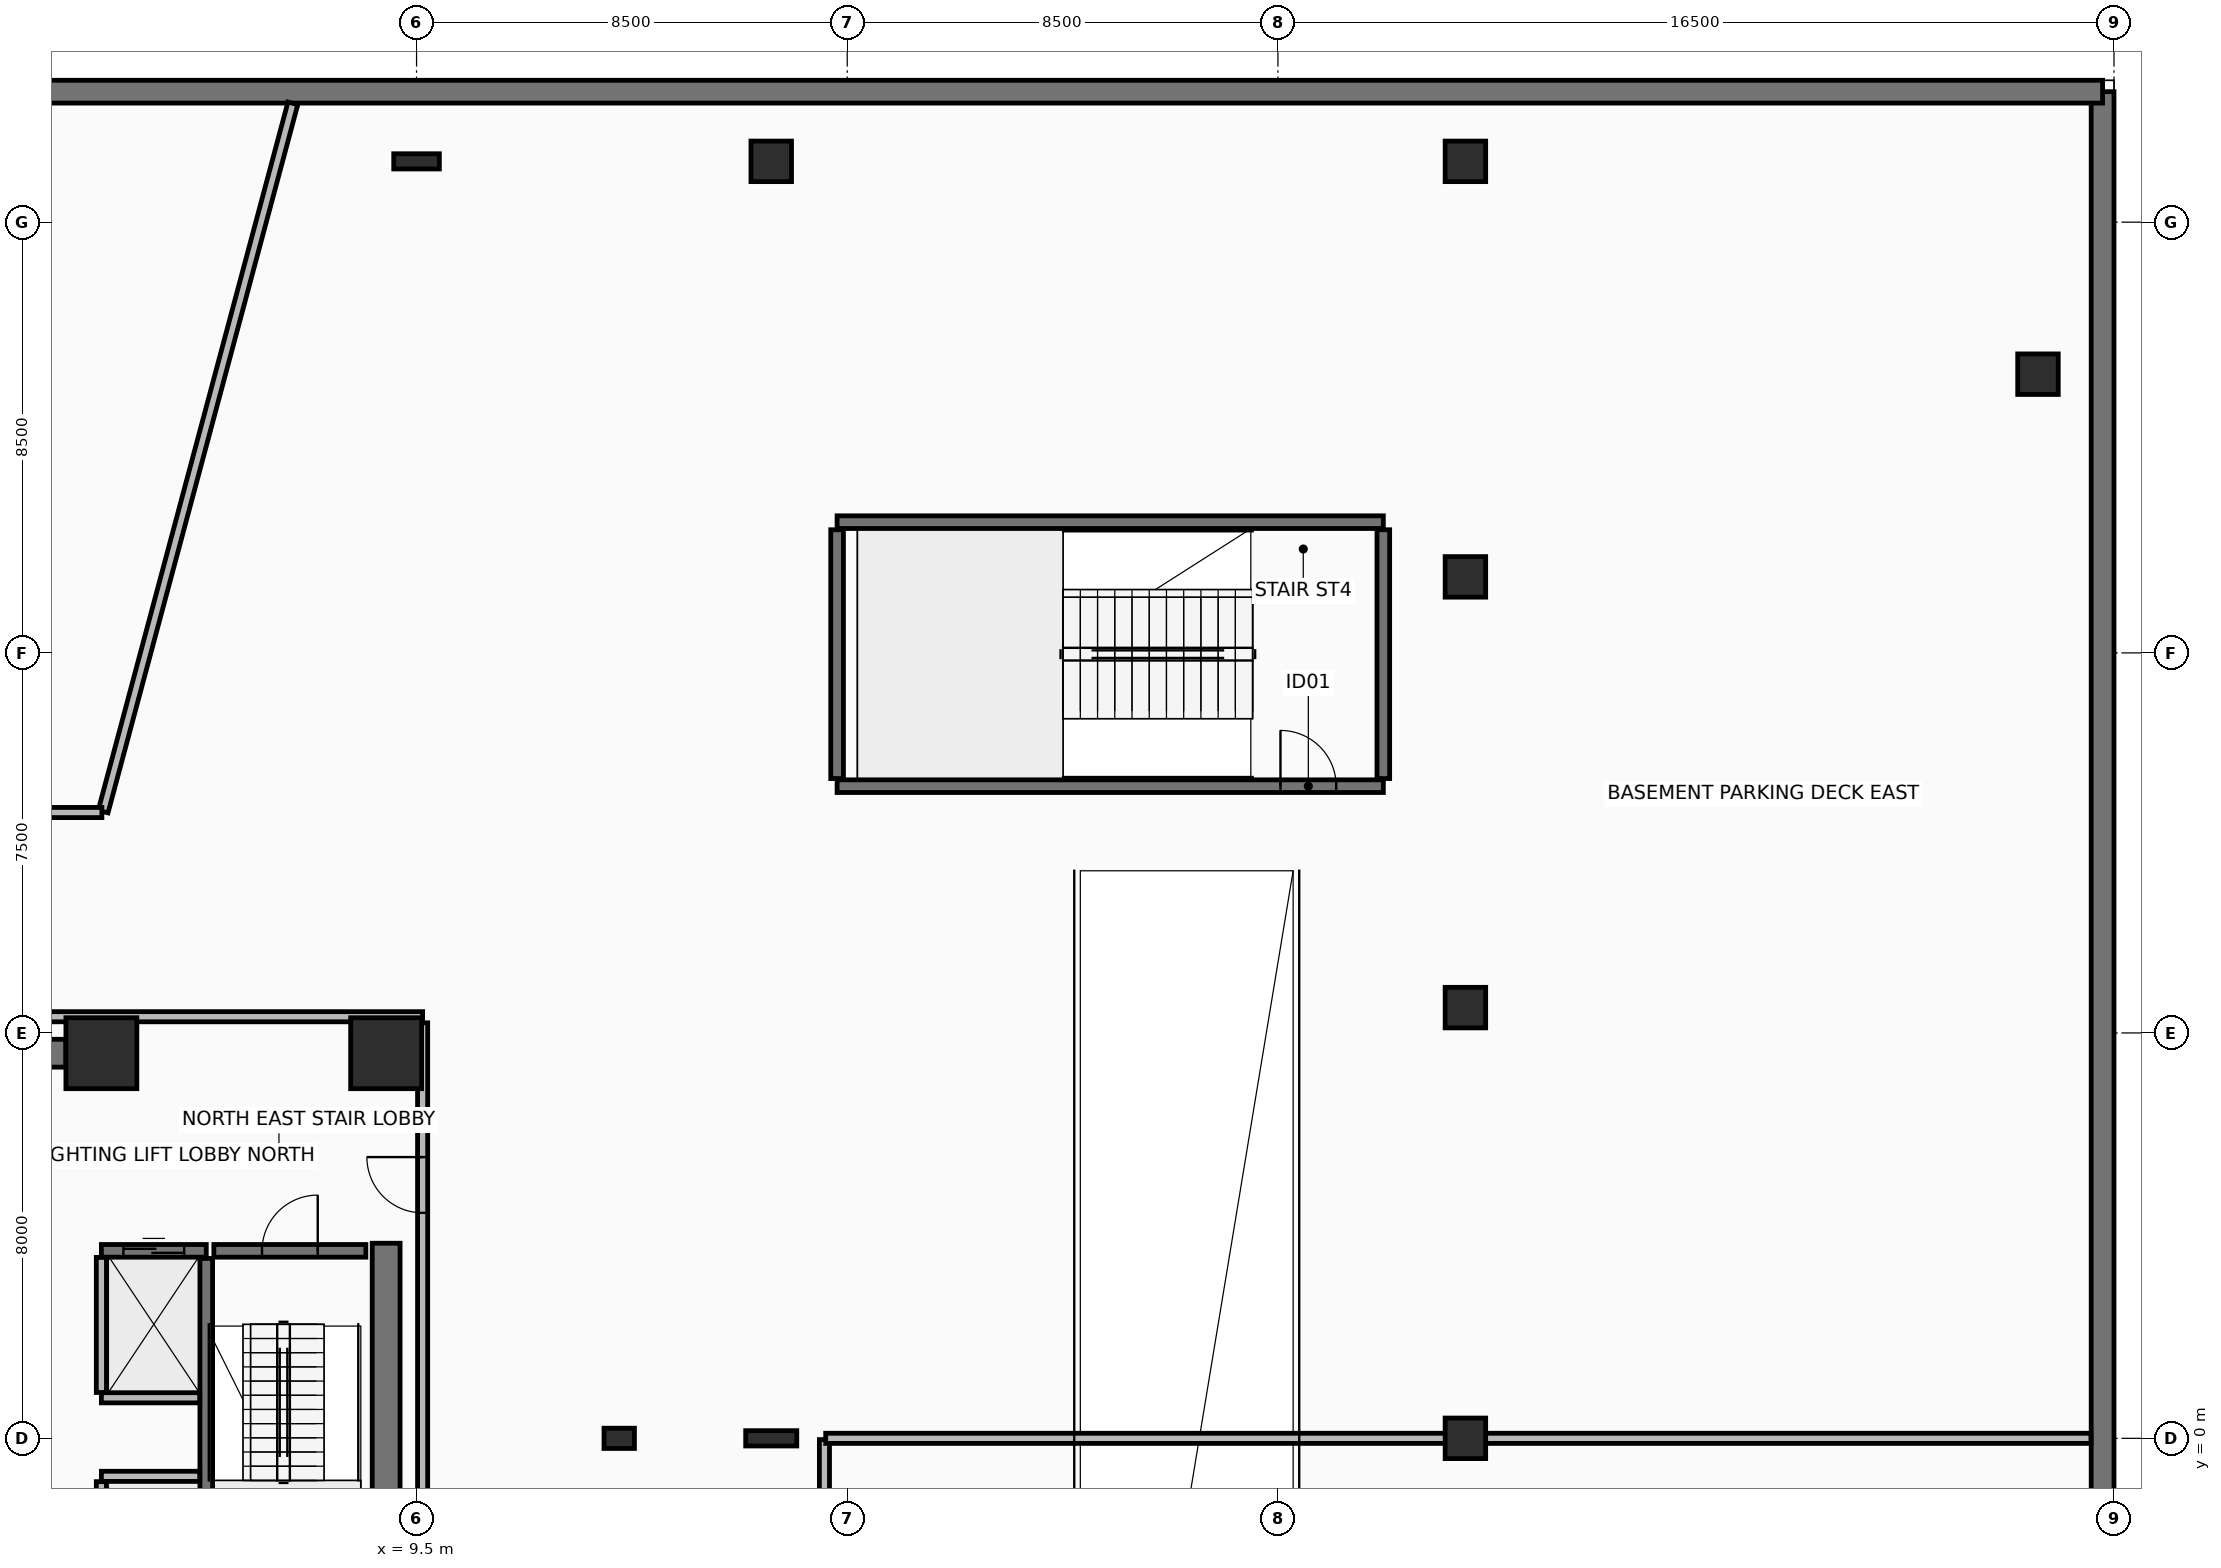
"""IFC4 building model, lengths in metres.
Left out: names, types, materials, properties, quantities, classifications, styles, units other than length and angle.
Written with IfcOpenShell. Run it as: python <this file> out.ifc"""

import sys

from ifc_helpers import new_model, si_unit, direction, frame, frame_2d, origin, origin_2d, place, context, subcontext, project, spatial, rectangle, hollow_rectangle, i_section, extrude, element, fill, save


model = new_model("IFC4")
c1 = context("Model", 3, precision=1e-05, world=origin(), true_north=direction((0.0, 1.0)))
c2 = subcontext(c1, "Body", "Model", "MODEL_VIEW")
j1 = project(units=[si_unit("LENGTHUNIT", "METRE"), si_unit("PLANEANGLEUNIT", "RADIAN")], contexts=[c1])
p1 = place(None, origin())
s1 = spatial("IfcSite", under=j1, at=p1, CompositionType="ELEMENT")
p2 = place(p1, origin())
s2 = spatial("IfcBuilding", under=s1, at=p2, CompositionType="ELEMENT")
p3 = place(p2, frame((0.0, 0.0, -4.5)))
s3 = spatial("IfcBuildingStorey", under=s2, at=p3, CompositionType="ELEMENT", Elevation=-4.5)
for number, where, z_axis, x_axis in (
    (1, (8.9, 7.6, 0.0), (0.0, 0.0, 1.0), (1.0, 0.0, 0.0)),
    (2, (3.28, 7.6, 0.0), (0.0, 0.0, 1.0), (1.0, 0.0, 0.0)),
):
    element("IfcColumn", number, at=place(p3, frame(where, z_axis=z_axis, x_axis=x_axis)), inside=s3, PredefinedType="COLUMN", context=c2, shape_type="SweptSolid", body=[
        extrude(rectangle(XDim=1.4, YDim=1.4, at=origin_2d()), origin(), (0.0, 0.0, 1.0), 4.5),
    ])
p4 = place(p3, frame((13.5, 0.0, 0.0), z_axis=(0.0, 0.0, 1.0), x_axis=(1.0, 0.0, 0.0)))
e3 = element("IfcColumn", 3, at=p4, inside=s3, PredefinedType="PILASTER", context=c2, shape_type="SweptSolid", body=[
    extrude(rectangle(XDim=0.6, YDim=0.4, at=origin_2d()), origin(), (0.0, 0.0, 1.0), 4.5),
])
p5 = place(p3, frame((9.5, 25.2, 0.0), z_axis=(0.0, 0.0, 1.0), x_axis=(1.0, 0.0, 0.0)))
e4 = element("IfcColumn", 4, at=p5, inside=s3, PredefinedType="COLUMN", context=c2, shape_type="SweptSolid", body=[
    extrude(i_section(OverallWidth=0.3, OverallDepth=0.9, WebThickness=0.019, FlangeThickness=0.035, at=origin_2d()), origin(), (0.0, 0.0, 1.0), 4.5),
])
for number, where, z_axis, x_axis in (
    (5, (16.5, 25.2, 0.0), (0.0, 0.0, 1.0), (1.0, 0.0, 0.0)),
    (6, (30.2, 25.2, 0.0), (0.0, 0.0, 1.0), (1.0, 0.0, 0.0)),
    (7, (30.2, 0.0, 0.0), (0.0, 0.0, 1.0), (1.0, 0.0, 0.0)),
    (8, (30.2, 8.5, 0.0), (0.0, 0.0, 1.0), (1.0, 0.0, 0.0)),
    (9, (30.2, 17.0, 0.0), (0.0, 0.0, 1.0), (1.0, 0.0, 0.0)),
):
    element("IfcColumn", number, at=place(p3, frame(where, z_axis=z_axis, x_axis=x_axis)), inside=s3, PredefinedType="COLUMN", context=c2, shape_type="SweptSolid", body=[
        extrude(hollow_rectangle(XDim=0.8, YDim=0.8, WallThickness=0.045, at=origin_2d()), origin(), (0.0, 0.0, 1.0), 4.5),
    ])
p6 = place(p3, frame((16.5, 0.0, 0.0), z_axis=(0.0, 0.0, 1.0), x_axis=(1.0, 0.0, 0.0)))
e10 = element("IfcColumn", 10, at=p6, inside=s3, PredefinedType="COLUMN", context=c2, shape_type="SweptSolid", body=[
    extrude(i_section(OverallWidth=0.302, OverallDepth=1.008, WebThickness=0.021, FlangeThickness=0.04, at=origin_2d()), origin(), (0.0, 0.0, 1.0), 4.5),
])
p7 = place(p3, frame((41.5, 21.0, 0.0), z_axis=(0.0, 0.0, 1.0), x_axis=(1.0, 0.0, 0.0)))
e11 = element("IfcColumn", 11, at=p7, inside=s3, PredefinedType="COLUMN", context=c2, shape_type="SweptSolid", body=[
    extrude(hollow_rectangle(XDim=0.8, YDim=0.8, WallThickness=0.045, at=origin_2d()), origin(), (0.0, 0.0, 1.0), 4.5),
])
p8 = place(p3, frame((42.775, -27.775, 0.0), z_axis=(0.0, 0.0, 1.0), x_axis=(0.0, 1.0, 0.0)))
e12 = element("IfcWall", 12, at=p8, inside=s3, PredefinedType="STANDARD", context=c2, shape_type="SweptSolid", body=[
    extrude(rectangle(XDim=54.35, YDim=0.45, at=frame_2d((27.175, 0.0))), origin(), (0.0, 0.0, 1.0), 4.2),
])
p9 = place(p3, frame((42.775, 26.575, 0.0), z_axis=(0.0, 0.0, 1.0), x_axis=(-1.0, 0.0, 0.0)))
e13 = element("IfcWall", 13, at=p9, inside=s3, PredefinedType="STANDARD", context=c2, shape_type="SweptSolid", body=[
    extrude(rectangle(XDim=85.55, YDim=0.45, at=frame_2d((42.775, 0.0))), origin(), (0.0, 0.0, 1.0), 4.2),
])
p10 = place(p3, frame((-2.8, 7.6, 0.0), z_axis=(0.0, 0.0, 1.0), x_axis=(1.0, 0.0, 0.0)))
e14 = element("IfcWall", 14, at=p10, inside=s3, PredefinedType="SHEAR", context=c2, shape_type="SweptSolid", body=[
    extrude(rectangle(XDim=5.38, YDim=0.55, at=frame_2d((2.69, 0.0))), origin(), (0.0, 0.0, 1.0), 4.2),
])
p11 = place(p3, frame((8.9, -6.85, 0.0), z_axis=(0.0, 0.0, 1.0), x_axis=(0.0, 1.0, 0.0)))
e15 = element("IfcWall", 15, at=p11, inside=s3, PredefinedType="SHEAR", context=c2, shape_type="SweptSolid", body=[
    extrude(rectangle(XDim=10.7, YDim=0.55, at=frame_2d((5.35, 0.0))), origin(), (0.0, 0.0, 1.0), 4.2),
])
p12 = place(p3, frame((9.62, 8.32, 0.0), z_axis=(0.0, 0.0, 1.0), x_axis=(-1.0, 0.0, 0.0)))
e16 = element("IfcWall", 16, at=p12, inside=s3, PredefinedType="PARTITIONING", context=c2, shape_type="SweptSolid", body=[
    extrude(rectangle(XDim=19.24, YDim=0.2, at=frame_2d((9.62, 0.0))), origin(), (0.0, 0.0, 1.0), 3.545),
])
p13 = place(p12, frame((14.22, 0.0, 0.0)))
e17 = element("IfcOpeningElement", 17, at=p13, cuts=e16, PredefinedType="OPENING", context=c2, shape_type="SweptSolid", body=[
    extrude(rectangle(XDim=0.9, YDim=2.1, at=frame_2d((0.45, 1.05))), frame((0.0, 0.11, 0.0), z_axis=(0.0, -1.0, 0.0), x_axis=(1.0, 0.0, 0.0)), (0.0, 0.0, 1.0), 0.22),
])
p14 = place(p3, frame((9.62, -8.2, 0.0), z_axis=(0.0, 0.0, 1.0), x_axis=(0.0, 1.0, 0.0)))
e18 = element("IfcWall", 18, at=p14, inside=s3, PredefinedType="PARTITIONING", context=c2, shape_type="SweptSolid", body=[
    extrude(rectangle(XDim=16.4, YDim=0.2, at=frame_2d((8.2, 0.0))), origin(), (0.0, 0.0, 1.0), 3.545),
])
p15 = place(p14, frame((12.65, 0.0, 0.0)))
e19 = element("IfcOpeningElement", 19, at=p15, cuts=e18, PredefinedType="OPENING", context=c2, shape_type="SweptSolid", body=[
    extrude(rectangle(XDim=1.1, YDim=2.15, at=frame_2d((0.55, 1.075))), frame((0.0, 0.11, 0.0), z_axis=(0.0, -1.0, 0.0), x_axis=(1.0, 0.0, 0.0)), (0.0, 0.0, 1.0), 0.22),
])
p16 = place(p3, frame((5.35, -3.75, 0.0), z_axis=(0.0, 0.0, 1.0), x_axis=(0.0, 1.0, 0.0)))
e20 = element("IfcWall", 20, at=p16, inside=s3, PredefinedType="SHEAR", context=c2, shape_type="SweptSolid", body=[
    extrude(rectangle(XDim=7.3, YDim=0.25, at=frame_2d((3.65, 0.0))), origin(), (0.0, 0.0, 1.0), 4.2),
])
p17 = place(p3, frame((5.5, 3.7, 0.0), z_axis=(0.0, 0.0, 1.0), x_axis=(1.0, 0.0, 0.0)))
e21 = element("IfcWall", 21, at=p17, inside=s3, PredefinedType="SHEAR", context=c2, shape_type="SweptSolid", body=[
    extrude(rectangle(XDim=3.0, YDim=0.25, at=frame_2d((1.5, 0.0))), origin(), (0.0, 0.0, 1.0), 4.2),
])
p18 = place(p17, frame((0.95, 0.0, 0.0)))
e22 = element("IfcOpeningElement", 22, at=p18, cuts=e21, PredefinedType="OPENING", context=c2, shape_type="SweptSolid", body=[
    extrude(rectangle(XDim=1.1, YDim=2.15, at=frame_2d((0.55, 1.075))), frame((0.0, 0.135, 0.0), z_axis=(0.0, -1.0, 0.0), x_axis=(1.0, 0.0, 0.0)), (0.0, 0.0, 1.0), 0.27),
])
p19 = place(p3, frame((17.8, 12.87, 0.0), z_axis=(0.0, 0.0, 1.0), x_axis=(1.0, 0.0, 0.0)))
e23 = element("IfcWall", 23, at=p19, inside=s3, PredefinedType="SHEAR", context=c2, shape_type="SweptSolid", body=[
    extrude(rectangle(XDim=10.78, YDim=0.25, at=frame_2d((5.39, 0.0))), origin(), (0.0, 0.0, 1.0), 4.2),
])
p20 = place(p19, frame((8.75, 0.0, 0.0)))
e24 = element("IfcOpeningElement", 24, at=p20, cuts=e23, PredefinedType="OPENING", context=c2, shape_type="SweptSolid", body=[
    extrude(rectangle(XDim=1.1, YDim=2.15, at=frame_2d((0.55, 1.075))), frame((0.0, 0.135, 0.0), z_axis=(0.0, -1.0, 0.0), x_axis=(1.0, 0.0, 0.0)), (0.0, 0.0, 1.0), 0.27),
])
p21 = place(p3, frame((17.8, 18.08, 0.0), z_axis=(0.0, 0.0, 1.0), x_axis=(1.0, 0.0, 0.0)))
e25 = element("IfcWall", 25, at=p21, inside=s3, PredefinedType="SHEAR", context=c2, shape_type="SweptSolid", body=[
    extrude(rectangle(XDim=10.78, YDim=0.25, at=frame_2d((5.39, 0.0))), origin(), (0.0, 0.0, 1.0), 4.2),
])
for number, where, z_axis, x_axis in (
    (26, (17.8, 13.02, 0.0), (0.0, 0.0, 1.0), (0.0, 1.0, 0.0)),
    (27, (28.58, 13.02, 0.0), (0.0, 0.0, 1.0), (0.0, 1.0, 0.0)),
):
    element("IfcWall", number, at=place(p3, frame(where, z_axis=z_axis, x_axis=x_axis)), inside=s3, PredefinedType="SHEAR", context=c2, shape_type="SweptSolid", body=[
        extrude(rectangle(XDim=4.91, YDim=0.25, at=frame_2d((2.455, 0.0))), origin(), (0.0, 0.0, 1.0), 4.2),
    ])
p22 = place(p3, frame((3.28, 3.7, 0.0), z_axis=(0.0, 0.0, 1.0), x_axis=(1.0, 0.0, 0.0)))
e28 = element("IfcWall", 28, at=p22, inside=s3, PredefinedType="SHEAR", context=c2, shape_type="SweptSolid", body=[
    extrude(rectangle(XDim=2.07, YDim=0.25, at=frame_2d((1.035, 0.0))), origin(), (0.0, 0.0, 1.0), 4.2),
])
p23 = place(p22, frame((0.435, 0.0, 0.0)))
e29 = element("IfcOpeningElement", 29, at=p23, cuts=e28, PredefinedType="OPENING", context=c2, shape_type="SweptSolid", body=[
    extrude(rectangle(XDim=1.2, YDim=2.2, at=frame_2d((0.6, 1.1))), frame((0.0, 0.135, 0.0), z_axis=(0.0, -1.0, 0.0), x_axis=(1.0, 0.0, 0.0)), (0.0, 0.0, 1.0), 0.27),
])
p24 = place(p3, frame((3.28, 0.8, 0.0), z_axis=(0.0, 0.0, 1.0), x_axis=(1.0, 0.0, 0.0)))
e30 = element("IfcWall", 30, at=p24, inside=s3, PredefinedType="PARTITIONING", context=c2, shape_type="SweptSolid", body=[
    extrude(rectangle(XDim=1.94, YDim=0.2, at=frame_2d((0.97, 0.0))), origin(), (0.0, 0.0, 1.0), 4.2),
])
p25 = place(p3, frame((3.28, 0.905, 0.0), z_axis=(0.0, 0.0, 1.0), x_axis=(0.0, 1.0, 0.0)))
e31 = element("IfcWall", 31, at=p25, inside=s3, PredefinedType="PARTITIONING", context=c2, shape_type="SweptSolid", body=[
    extrude(rectangle(XDim=2.665, YDim=0.2, at=frame_2d((1.333, 0.0))), origin(), (0.0, 0.0, 1.0), 4.2),
])
p26 = place(p3, frame((3.28, -0.75, 0.0), z_axis=(0.0, 0.0, 1.0), x_axis=(1.0, 0.0, 0.0)))
e32 = element("IfcWall", 32, at=p26, inside=s3, PredefinedType="PARTITIONING", context=c2, shape_type="SweptSolid", body=[
    extrude(rectangle(XDim=1.94, YDim=0.2, at=frame_2d((0.97, 0.0))), origin(), (0.0, 0.0, 1.0), 4.2),
])
p27 = place(p3, frame((3.28, -3.57, 0.0), z_axis=(0.0, 0.0, 1.0), x_axis=(0.0, 1.0, 0.0)))
e33 = element("IfcWall", 33, at=p27, inside=s3, PredefinedType="PARTITIONING", context=c2, shape_type="SweptSolid", body=[
    extrude(rectangle(XDim=2.715, YDim=0.2, at=frame_2d((1.357, 0.0))), origin(), (0.0, 0.0, 1.0), 4.2),
])
p28 = place(p3, frame((7.059, 26.345, 0.0), z_axis=(0.0, 0.0, 1.0), x_axis=(-0.258810302239, -0.96592816889, 0.0)))
e34 = element("IfcWall", 34, at=p28, inside=s3, PredefinedType="PARTITIONING", context=c2, shape_type="SweptSolid", body=[
    extrude(rectangle(XDim=14.469, YDim=0.2, at=frame_2d((7.235, 0.0))), origin(), (0.0, 0.0, 1.0), 3.295),
])
p29 = place(p3, frame((3.29, 12.35, 0.0), z_axis=(0.0, 0.0, 1.0), x_axis=(-1.0, 0.0, 0.0)))
e35 = element("IfcWall", 35, at=p29, inside=s3, PredefinedType="PARTITIONING", context=c2, shape_type="SweptSolid", body=[
    extrude(rectangle(XDim=11.785, YDim=0.2, at=frame_2d((5.893, 0.0))), origin(), (0.0, 0.0, 1.0), 3.545),
])
p30 = place(p29, frame((5.442, 0.0, 0.0)))
e36 = element("IfcOpeningElement", 36, at=p30, cuts=e35, PredefinedType="OPENING", context=c2, shape_type="SweptSolid", body=[
    extrude(rectangle(XDim=0.9, YDim=2.1, at=frame_2d((0.45, 1.05))), frame((0.0, 0.11, 0.0), z_axis=(0.0, -1.0, 0.0), x_axis=(1.0, 0.0, 0.0)), (0.0, 0.0, 1.0), 0.22),
])
p31 = place(p3, frame((17.55, -15.849, 0.0), z_axis=(0.0, 0.0, 1.0), x_axis=(0.0, 1.0, 0.0)))
e37 = element("IfcWall", 37, at=p31, inside=s3, PredefinedType="PARTITIONING", context=c2, shape_type="SweptSolid", body=[
    extrude(rectangle(XDim=15.824, YDim=0.2, at=frame_2d((7.912, 0.0))), origin(), (0.0, 0.0, 1.0), 3.545),
])
p32 = place(p31, frame((7.462, 0.0, 0.0)))
e38 = element("IfcOpeningElement", 38, at=p32, cuts=e37, PredefinedType="OPENING", context=c2, shape_type="SweptSolid", body=[
    extrude(rectangle(XDim=0.9, YDim=2.1, at=frame_2d((0.45, 1.05))), frame((0.0, 0.11, 0.0), z_axis=(0.0, -1.0, 0.0), x_axis=(1.0, 0.0, 0.0)), (0.0, 0.0, 1.0), 0.22),
])
p33 = place(p3, frame((17.575, 0.0, 0.0), z_axis=(0.0, 0.0, 1.0), x_axis=(1.0, 0.0, 0.0)))
e39 = element("IfcWall", 39, at=p33, inside=s3, PredefinedType="PARTITIONING", context=c2, shape_type="SweptSolid", body=[
    extrude(rectangle(XDim=24.97, YDim=0.2, at=frame_2d((12.485, 0.0))), origin(), (0.0, 0.0, 1.0), 3.395),
])
p34 = place(p15, frame((1.1, 0.0, 0.0), z_axis=(0.0, 0.0, 1.0), x_axis=(-1.0, 0.0, 0.0)))
e40 = element("IfcDoor", 40, at=p34, inside=s3, OperationType="SINGLE_SWING_LEFT", PredefinedType="DOOR", context=c2, shape_type="SweptSolid", body=[
    extrude(rectangle(XDim=1.1, YDim=2.15, at=frame_2d((0.55, 1.075))), frame((0.0, 0.025, 0.0), z_axis=(0.0, -1.0, 0.0), x_axis=(1.0, 0.0, 0.0)), (0.0, 0.0, 1.0), 0.05),
])
fill(e19, e40)
p35 = place(p18, frame((1.1, 0.0, 0.0), z_axis=(0.0, 0.0, 1.0), x_axis=(-1.0, 0.0, 0.0)))
e41 = element("IfcDoor", 41, at=p35, inside=s3, OperationType="SINGLE_SWING_LEFT", PredefinedType="DOOR", context=c2, shape_type="SweptSolid", body=[
    extrude(rectangle(XDim=1.1, YDim=2.15, at=frame_2d((0.55, 1.075))), frame((0.0, 0.025, 0.0), z_axis=(0.0, -1.0, 0.0), x_axis=(1.0, 0.0, 0.0)), (0.0, 0.0, 1.0), 0.05),
])
fill(e22, e41)
p36 = place(p20, origin())
e42 = element("IfcDoor", 42, at=p36, inside=s3, OperationType="SINGLE_SWING_LEFT", PredefinedType="DOOR", context=c2, shape_type="SweptSolid", body=[
    extrude(rectangle(XDim=1.1, YDim=2.15, at=frame_2d((0.55, 1.075))), frame((0.0, 0.025, 0.0), z_axis=(0.0, -1.0, 0.0), x_axis=(1.0, 0.0, 0.0)), (0.0, 0.0, 1.0), 0.05),
])
fill(e24, e42)
p37 = place(p23, origin())
e43 = element("IfcDoor", 43, at=p37, inside=s3, OperationType="SLIDING_TO_RIGHT", PredefinedType="DOOR", context=c2, shape_type="SweptSolid", body=[
    extrude(rectangle(XDim=1.2, YDim=2.2, at=frame_2d((0.6, 1.1))), frame((0.0, 0.025, 0.0), z_axis=(0.0, -1.0, 0.0), x_axis=(1.0, 0.0, 0.0)), (0.0, 0.0, 1.0), 0.05),
])
fill(e29, e43)
save(model, sys.argv[1])
